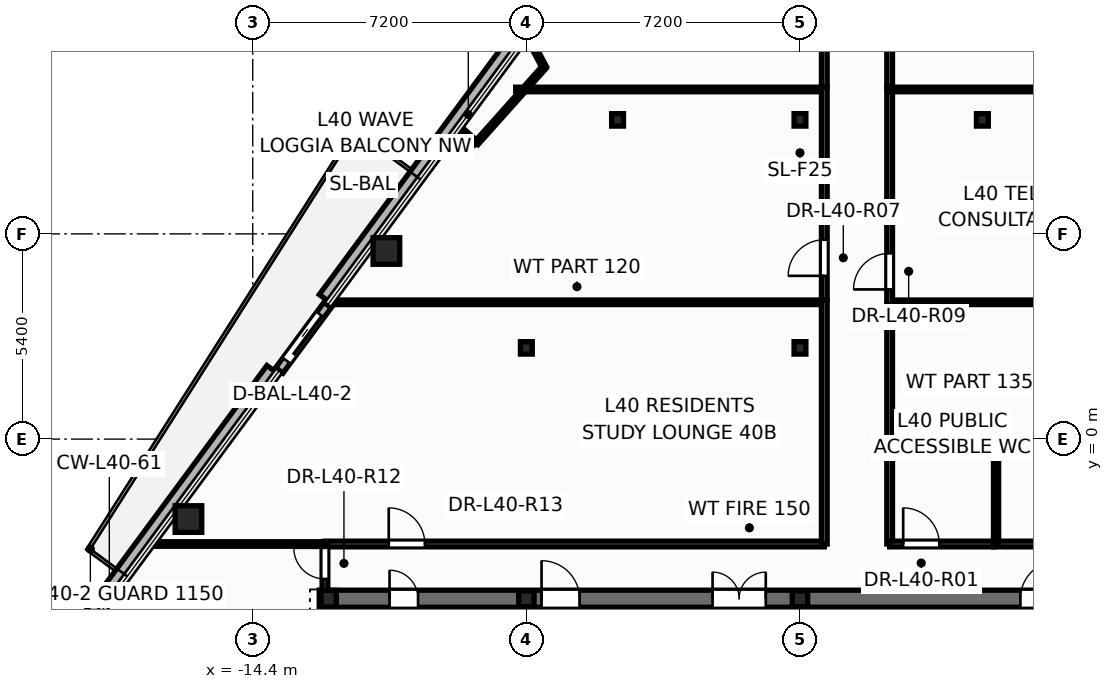
"""IFC4 building model, lengths in metres.
Left out: names, types, materials, properties, quantities, classifications, styles, units other than length and angle.
Written with IfcOpenShell. Run it as: python <this file> out.ifc"""

import sys

from ifc_helpers import new_model, si_unit, direction, frame, frame_2d, origin, origin_2d, place, context, subcontext, project, spatial, rectangle, hollow_circle, i_section, extrude, element, fill, save


model = new_model("IFC4")
c1 = context("Model", 3, precision=1e-05, world=origin(), true_north=direction((0.0, 1.0)))
c2 = subcontext(c1, "Body", "Model", "MODEL_VIEW")
j1 = project(units=[si_unit("LENGTHUNIT", "METRE"), si_unit("PLANEANGLEUNIT", "RADIAN")], contexts=[c1])
p1 = place(None, origin())
s1 = spatial("IfcSite", under=j1, at=p1, CompositionType="ELEMENT")
p2 = place(p1, origin())
s2 = spatial("IfcBuilding", under=s1, at=p2, CompositionType="ELEMENT")
p3 = place(p2, frame((0.0, 0.0, 154.5)))
s3 = spatial("IfcBuildingStorey", under=s2, at=p3, CompositionType="ELEMENT", Elevation=154.5)
for number, where, z_axis, x_axis in (
    (1, (-10.883, 4.95, 0.0), (0.0, 0.0, 1.0), (1.0, 0.0, 0.0)),
    (2, (-16.092, -2.103, 0.0), (0.0, 0.0, 1.0), (1.0, 0.0, 0.0)),
):
    element("IfcColumn", number, at=place(p3, frame(where, z_axis=z_axis, x_axis=x_axis)), inside=s3, PredefinedType="COLUMN", context=c2, shape_type="SweptSolid", body=[
        extrude(hollow_circle(Radius=0.35, WallThickness=0.03, at=origin_2d()), origin(), (0.0, 0.0, 1.0), 3.6),
    ])
p4 = place(p3, frame((-12.4, -4.2, 0.0), z_axis=(0.0, 0.0, 1.0), x_axis=(1.0, 0.0, 0.0)))
e3 = element("IfcColumn", 3, at=p4, inside=s3, PredefinedType="COLUMN", context=c2, shape_type="SweptSolid", body=[
    extrude(i_section(OverallWidth=0.4, OverallDepth=0.44, WebThickness=0.028, FlangeThickness=0.04, at=origin_2d()), origin(), (0.0, 0.0, 1.0), 3.6),
])
for number, where, z_axis, x_axis in (
    (4, (-7.2, -4.2, 0.0), (0.0, 0.0, 1.0), (1.0, 0.0, 0.0)),
    (5, (0.0, -4.2, 0.0), (0.0, 0.0, 1.0), (1.0, 0.0, 0.0)),
):
    element("IfcColumn", number, at=place(p3, frame(where, z_axis=z_axis, x_axis=x_axis)), inside=s3, PredefinedType="PILASTER", context=c2, shape_type="SweptSolid", body=[
        extrude(i_section(OverallWidth=0.405, OverallDepth=0.414, WebThickness=0.022, FlangeThickness=0.032, at=origin_2d()), origin(), (0.0, 0.0, 1.0), 3.6),
    ])
for number, where, z_axis, x_axis in (
    (6, (-7.2, 2.4, 0.0), (0.0, 0.0, 1.0), (1.0, 0.0, 0.0)),
    (7, (0.0, 2.4, 0.0), (0.0, 0.0, 1.0), (1.0, 0.0, 0.0)),
    (8, (-4.8, 8.4, 0.0), (0.0, 0.0, 1.0), (1.0, 0.0, 0.0)),
    (9, (0.0, 8.4, 0.0), (0.0, 0.0, 1.0), (1.0, 0.0, 0.0)),
    (10, (4.8, 8.4, 0.0), (0.0, 0.0, 1.0), (1.0, 0.0, 0.0)),
):
    element("IfcColumn", number, at=place(p3, frame(where, z_axis=z_axis, x_axis=x_axis)), inside=s3, PredefinedType="COLUMN", context=c2, shape_type="SweptSolid", body=[
        extrude(i_section(OverallWidth=0.311, OverallDepth=0.327, WebThickness=0.016, FlangeThickness=0.025, at=origin_2d()), origin(), (0.0, 0.0, 1.0), 3.6),
    ])
p5 = place(p3, frame((13.901, 1.806, -0.2), z_axis=(0.0, 0.0, 1.0), x_axis=(-0.594075751219, 0.804409101026, 0.0)))
e11 = element("IfcWall", 11, at=p5, inside=s3, PredefinedType="PARAPET", context=c2, shape_type="SweptSolid", body=[
    extrude(rectangle(XDim=14.632, YDim=0.36, at=frame_2d((7.316, 0.0))), origin(), (0.0, 0.0, 1.0), 0.38),
])
p6 = place(p3, frame((-5.208, 13.576, -0.2), z_axis=(0.0, 0.0, 1.0), x_axis=(-0.594071325753, -0.804412369322, 0.0)))
e12 = element("IfcWall", 12, at=p6, inside=s3, PredefinedType="PARAPET", context=c2, shape_type="SweptSolid", body=[
    extrude(rectangle(XDim=12.282, YDim=0.36, at=frame_2d((6.141, 0.0))), origin(), (0.0, 0.0, 1.0), 0.38),
])
p7 = place(p3, frame((-13.883, 1.83, -0.2), z_axis=(0.0, 0.0, 1.0), x_axis=(-0.594082392526, -0.804404196216, 0.0)))
e13 = element("IfcWall", 13, at=p7, inside=s3, PredefinedType="PARAPET", context=c2, shape_type="SweptSolid", body=[
    extrude(rectangle(XDim=14.88, YDim=0.36, at=frame_2d((7.44, 0.0))), origin(), (0.0, 0.0, 1.0), 0.38),
])
p8 = place(p3, frame((-12.429, 3.529, -0.015), z_axis=(0.0, 0.0, 1.0), x_axis=(-0.594050978498, -0.804427395696, 0.0)))
e14 = element("IfcWall", 14, at=p8, inside=s3, PredefinedType="STANDARD", context=c2, shape_type="SweptSolid", body=[
    extrude(rectangle(XDim=2.14, YDim=0.24, at=frame_2d((1.07, 0.0))), origin(), (0.0, 0.0, 1.0), 2.807),
])
p9 = place(p8, frame((0.32, 0.0, 0.015)))
e15 = element("IfcOpeningElement", 15, at=p9, cuts=e14, PredefinedType="OPENING", context=c2, shape_type="SweptSolid", body=[
    extrude(rectangle(XDim=1.506, YDim=2.204, at=frame_2d((0.75, 1.102))), frame((0.0, 0.13, 0.0), z_axis=(0.0, -1.0, 0.0), x_axis=(1.0, 0.0, 0.0)), (0.0, 0.0, 1.0), 0.26),
])
p10 = place(p3, frame((-2.88, -5.6, 0.0), z_axis=(0.0, 0.0, 1.0), x_axis=(0.0, 1.0, 0.0)))
e16 = element("IfcWall", 16, at=p10, inside=s3, PredefinedType="PARTITIONING", context=c2, shape_type="SweptSolid", body=[
    extrude(rectangle(XDim=1.15, YDim=0.15, at=frame_2d((0.575, 0.0))), origin(), (0.0, 0.0, 1.0), 3.35),
])
p11 = place(p3, frame((-12.65, -4.2, 0.0), z_axis=(0.0, 0.0, 1.0), x_axis=(1.0, 0.0, 0.0)))
e17 = element("IfcWall", 17, at=p11, inside=s3, PredefinedType="SHEAR", context=c2, shape_type="SweptSolid", body=[
    extrude(rectangle(XDim=25.3, YDim=0.45, at=frame_2d((12.65, 0.0))), origin(), (0.0, 0.0, 1.0), 3.6),
])
p12 = place(p11, frame((1.85, 0.0, 0.0)))
e18 = element("IfcOpeningElement", 18, at=p12, cuts=e17, PredefinedType="OPENING", context=c2, shape_type="SweptSolid", body=[
    extrude(rectangle(XDim=0.756, YDim=2.054, at=frame_2d((0.375, 1.027))), frame((0.0, 0.235, 0.0), z_axis=(0.0, -1.0, 0.0), x_axis=(1.0, 0.0, 0.0)), (0.0, 0.0, 1.0), 0.47),
])
p13 = place(p11, frame((21.85, 0.0, 0.0)))
e19 = element("IfcOpeningElement", 19, at=p13, cuts=e17, PredefinedType="OPENING", context=c2, shape_type="SweptSolid", body=[
    extrude(rectangle(XDim=0.756, YDim=2.054, at=frame_2d((0.375, 1.027))), frame((0.0, 0.235, 0.0), z_axis=(0.0, -1.0, 0.0), x_axis=(1.0, 0.0, 0.0)), (0.0, 0.0, 1.0), 0.47),
])
p14 = place(p11, frame((23.5, 0.0, 0.0)))
e20 = element("IfcOpeningElement", 20, at=p14, cuts=e17, PredefinedType="OPENING", context=c2, shape_type="SweptSolid", body=[
    extrude(rectangle(XDim=0.756, YDim=2.054, at=frame_2d((0.375, 1.027))), frame((0.0, 0.235, 0.0), z_axis=(0.0, -1.0, 0.0), x_axis=(1.0, 0.0, 0.0)), (0.0, 0.0, 1.0), 0.47),
])
p15 = place(p11, frame((5.85, 0.0, 0.0)))
e21 = element("IfcOpeningElement", 21, at=p15, cuts=e17, PredefinedType="OPENING", context=c2, shape_type="SweptSolid", body=[
    extrude(rectangle(XDim=1.006, YDim=2.104, at=frame_2d((0.5, 1.052))), frame((0.0, 0.235, 0.0), z_axis=(0.0, -1.0, 0.0), x_axis=(1.0, 0.0, 0.0)), (0.0, 0.0, 1.0), 0.47),
])
p16 = place(p11, frame((10.35, 0.0, 0.0)))
e22 = element("IfcOpeningElement", 22, at=p16, cuts=e17, PredefinedType="OPENING", context=c2, shape_type="SweptSolid", body=[
    extrude(rectangle(XDim=1.406, YDim=2.154, at=frame_2d((0.7, 1.077))), frame((0.0, 0.235, 0.0), z_axis=(0.0, -1.0, 0.0), x_axis=(1.0, 0.0, 0.0)), (0.0, 0.0, 1.0), 0.47),
])
p17 = place(p11, frame((18.45, 0.0, 0.0)))
e23 = element("IfcOpeningElement", 23, at=p17, cuts=e17, PredefinedType="OPENING", context=c2, shape_type="SweptSolid", body=[
    extrude(rectangle(XDim=1.006, YDim=2.104, at=frame_2d((0.5, 1.052))), frame((0.0, 0.235, 0.0), z_axis=(0.0, -1.0, 0.0), x_axis=(1.0, 0.0, 0.0)), (0.0, 0.0, 1.0), 0.47),
])
p18 = place(p3, frame((-8.48, -13.85, 0.0), z_axis=(0.0, 0.0, 1.0), x_axis=(0.0, 1.0, 0.0)))
e24 = element("IfcWall", 24, at=p18, inside=s3, PredefinedType="SHEAR", context=c2, shape_type="SweptSolid", body=[
    extrude(rectangle(XDim=9.4, YDim=0.25, at=frame_2d((4.7, 0.0))), origin(), (0.0, 0.0, 1.0), 3.6),
])
p19 = place(p18, frame((6.95, 0.0, 0.0)))
e25 = element("IfcOpeningElement", 25, at=p19, cuts=e24, PredefinedType="OPENING", context=c2, shape_type="SweptSolid", body=[
    extrude(rectangle(XDim=1.006, YDim=2.104, at=frame_2d((0.5, 1.052))), frame((0.0, 0.135, 0.0), z_axis=(0.0, -1.0, 0.0), x_axis=(1.0, 0.0, 0.0)), (0.0, 0.0, 1.0), 0.27),
])
for number, where, z_axis, x_axis in (
    (26, (-5.12, -13.85, 0.0), (0.0, 0.0, 1.0), (0.0, 1.0, 0.0)),
    (27, (5.12, -13.85, 0.0), (0.0, 0.0, 1.0), (0.0, 1.0, 0.0)),
):
    element("IfcWall", number, at=place(p3, frame(where, z_axis=z_axis, x_axis=x_axis)), inside=s3, PredefinedType="SHEAR", context=c2, shape_type="SweptSolid", body=[
        extrude(rectangle(XDim=9.4, YDim=0.25, at=frame_2d((4.7, 0.0))), origin(), (0.0, 0.0, 1.0), 3.6),
    ])
p20 = place(p3, frame((-12.4, -13.85, 0.0), z_axis=(0.0, 0.0, 1.0), x_axis=(0.0, 1.0, 0.0)))
e28 = element("IfcWall", 28, at=p20, inside=s3, PredefinedType="SHEAR", context=c2, shape_type="SweptSolid", body=[
    extrude(rectangle(XDim=9.4, YDim=0.45, at=frame_2d((4.7, 0.0))), origin(), (0.0, 0.0, 1.0), 3.6),
])
p21 = place(p3, frame((2.88, -9.45, 0.0), z_axis=(0.0, 0.0, 1.0), x_axis=(0.0, 1.0, 0.0)))
e29 = element("IfcWall", 29, at=p21, inside=s3, PredefinedType="SOLIDWALL", context=c2, shape_type="SweptSolid", body=[
    extrude(rectangle(XDim=5.0, YDim=0.2, at=frame_2d((2.5, 0.0))), origin(), (0.0, 0.0, 1.0), 3.35),
])
p22 = place(p21, frame((0.7, 0.0, 0.0)))
e30 = element("IfcOpeningElement", 30, at=p22, cuts=e29, PredefinedType="OPENING", context=c2, shape_type="SweptSolid", body=[
    extrude(rectangle(XDim=1.106, YDim=2.104, at=frame_2d((0.55, 1.052))), frame((0.0, 0.11, 0.0), z_axis=(0.0, -1.0, 0.0), x_axis=(1.0, 0.0, 0.0)), (0.0, 0.0, 1.0), 0.22),
])
p23 = place(p21, frame((3.15, 0.0, 0.0)))
e31 = element("IfcOpeningElement", 31, at=p23, cuts=e29, PredefinedType="OPENING", context=c2, shape_type="SweptSolid", body=[
    extrude(rectangle(XDim=1.106, YDim=2.104, at=frame_2d((0.55, 1.052))), frame((0.0, 0.11, 0.0), z_axis=(0.0, -1.0, 0.0), x_axis=(1.0, 0.0, 0.0)), (0.0, 0.0, 1.0), 0.22),
])
p24 = place(p3, frame((-12.5, -2.76, 0.0), z_axis=(0.0, 0.0, 1.0), x_axis=(1.0, 0.0, 0.0)))
e32 = element("IfcWall", 32, at=p24, inside=s3, PredefinedType="PARTITIONING", context=c2, shape_type="SweptSolid", body=[
    extrude(rectangle(XDim=13.14, YDim=0.15, at=frame_2d((6.57, 0.0))), origin(), (0.0, 0.0, 1.0), 2.325),
])
p25 = place(p24, frame((1.679, 0.0, 0.0)))
e33 = element("IfcOpeningElement", 33, at=p25, cuts=e32, PredefinedType="OPENING", context=c2, shape_type="SweptSolid", body=[
    extrude(rectangle(XDim=0.956, YDim=2.104, at=frame_2d((0.475, 1.052))), frame((0.0, 0.085, 0.0), z_axis=(0.0, -1.0, 0.0), x_axis=(1.0, 0.0, 0.0)), (0.0, 0.0, 1.0), 0.17),
])
p26 = place(p3, frame((-12.377, 3.6, 0.0), z_axis=(0.0, 0.0, 1.0), x_axis=(1.0, 0.0, 0.0)))
e34 = element("IfcWall", 34, at=p26, inside=s3, PredefinedType="PARTITIONING", context=c2, shape_type="SweptSolid", body=[
    extrude(rectangle(XDim=13.017, YDim=0.12, at=frame_2d((6.508, 0.0))), origin(), (0.0, 0.0, 1.0), 2.325),
])
p27 = place(p3, frame((2.36, 3.6, 0.0), z_axis=(0.0, 0.0, 1.0), x_axis=(1.0, 0.0, 0.0)))
e35 = element("IfcWall", 35, at=p27, inside=s3, PredefinedType="PARTITIONING", context=c2, shape_type="SweptSolid", body=[
    extrude(rectangle(XDim=10.017, YDim=0.12, at=frame_2d((5.008, 0.0))), origin(), (0.0, 0.0, 1.0), 2.325),
])
p28 = place(p3, frame((-7.48, 9.2, 0.0), z_axis=(0.0, 0.0, 1.0), x_axis=(1.0, 0.0, 0.0)))
e36 = element("IfcWall", 36, at=p28, inside=s3, PredefinedType="PARTITIONING", context=c2, shape_type="SweptSolid", body=[
    extrude(rectangle(XDim=8.12, YDim=0.12, at=frame_2d((4.06, 0.0))), origin(), (0.0, 0.0, 1.0), 2.325),
])
p29 = place(p3, frame((5.1, -2.76, 0.0), z_axis=(0.0, 0.0, 1.0), x_axis=(1.0, 0.0, 0.0)))
e37 = element("IfcWall", 37, at=p29, inside=s3, PredefinedType="PARTITIONING", context=c2, shape_type="SweptSolid", body=[
    extrude(rectangle(XDim=7.4, YDim=0.15, at=frame_2d((3.7, 0.0))), origin(), (0.0, 0.0, 1.0), 2.325),
])
p30 = place(p29, frame((3.663, 0.0, 0.0)))
e38 = element("IfcOpeningElement", 38, at=p30, cuts=e37, PredefinedType="OPENING", context=c2, shape_type="SweptSolid", body=[
    extrude(rectangle(XDim=0.956, YDim=2.104, at=frame_2d((0.475, 1.052))), frame((0.0, 0.085, 0.0), z_axis=(0.0, -1.0, 0.0), x_axis=(1.0, 0.0, 0.0)), (0.0, 0.0, 1.0), 0.17),
])
p31 = place(p3, frame((0.64, -2.76, 0.0), z_axis=(0.0, 0.0, 1.0), x_axis=(0.0, 1.0, 0.0)))
e39 = element("IfcWall", 39, at=p31, inside=s3, PredefinedType="PARTITIONING", context=c2, shape_type="SweptSolid", body=[
    extrude(rectangle(XDim=6.42, YDim=0.15, at=frame_2d((3.21, 0.0))), origin(), (0.0, 0.0, 1.0), 2.325),
])
p32 = place(p3, frame((0.64, 3.662, 0.0), z_axis=(0.0, 0.0, 1.0), x_axis=(0.0, 1.0, 0.0)))
e40 = element("IfcWall", 40, at=p32, inside=s3, PredefinedType="PARTITIONING", context=c2, shape_type="SweptSolid", body=[
    extrude(rectangle(XDim=5.598, YDim=0.15, at=frame_2d((2.799, 0.0))), origin(), (0.0, 0.0, 1.0), 2.325),
])
p33 = place(p32, frame((0.634, 0.0, 0.0)))
e41 = element("IfcOpeningElement", 41, at=p33, cuts=e40, PredefinedType="OPENING", context=c2, shape_type="SweptSolid", body=[
    extrude(rectangle(XDim=0.956, YDim=2.104, at=frame_2d((0.475, 1.052))), frame((0.0, 0.085, 0.0), z_axis=(0.0, -1.0, 0.0), x_axis=(1.0, 0.0, 0.0)), (0.0, 0.0, 1.0), 0.17),
])
p34 = place(p3, frame((2.36, 3.54, 0.0), z_axis=(0.0, 0.0, 1.0), x_axis=(0.0, 1.0, 0.0)))
e42 = element("IfcWall", 42, at=p34, inside=s3, PredefinedType="PARTITIONING", context=c2, shape_type="SweptSolid", body=[
    extrude(rectangle(XDim=5.72, YDim=0.15, at=frame_2d((2.86, 0.0))), origin(), (0.0, 0.0, 1.0), 2.325),
])
p35 = place(p34, frame((0.398, 0.0, 0.0)))
e43 = element("IfcOpeningElement", 43, at=p35, cuts=e42, PredefinedType="OPENING", context=c2, shape_type="SweptSolid", body=[
    extrude(rectangle(XDim=0.956, YDim=2.104, at=frame_2d((0.475, 1.052))), frame((0.0, 0.085, 0.0), z_axis=(0.0, -1.0, 0.0), x_axis=(1.0, 0.0, 0.0)), (0.0, 0.0, 1.0), 0.17),
])
p36 = place(p3, frame((2.36, 9.2, 0.0), z_axis=(0.0, 0.0, 1.0), x_axis=(1.0, 0.0, 0.0)))
e44 = element("IfcWall", 44, at=p36, inside=s3, PredefinedType="PARTITIONING", context=c2, shape_type="SweptSolid", body=[
    extrude(rectangle(XDim=5.12, YDim=0.12, at=frame_2d((2.56, 0.0))), origin(), (0.0, 0.0, 1.0), 2.325),
])
p37 = place(p3, frame((-17.074, -2.76, 0.0), z_axis=(0.0, 0.0, 1.0), x_axis=(1.0, 0.0, 0.0)))
e45 = element("IfcWall", 45, at=p37, inside=s3, PredefinedType="PARTITIONING", context=c2, shape_type="SweptSolid", body=[
    extrude(rectangle(XDim=4.574, YDim=0.12, at=frame_2d((2.287, 0.0))), origin(), (0.0, 0.0, 1.0), 2.792),
])
p38 = place(p3, frame((2.36, -2.76, 0.0), z_axis=(0.0, 0.0, 1.0), x_axis=(0.0, 1.0, 0.0)))
e46 = element("IfcWall", 46, at=p38, inside=s3, PredefinedType="PARTITIONING", context=c2, shape_type="SweptSolid", body=[
    extrude(rectangle(XDim=6.298, YDim=0.15, at=frame_2d((3.149, 0.0))), origin(), (0.0, 0.0, 1.0), 2.325),
])
p39 = place(p3, frame((2.36, -2.76, 0.0), z_axis=(0.0, 0.0, 1.0), x_axis=(1.0, 0.0, 0.0)))
e47 = element("IfcWall", 47, at=p39, inside=s3, PredefinedType="PARTITIONING", context=c2, shape_type="SweptSolid", body=[
    extrude(rectangle(XDim=2.738, YDim=0.15, at=frame_2d((1.369, 0.0))), origin(), (0.0, 0.0, 1.0), 2.919),
])
p40 = place(p39, frame((0.356, 0.0, 0.0)))
e48 = element("IfcOpeningElement", 48, at=p40, cuts=e47, PredefinedType="OPENING", context=c2, shape_type="SweptSolid", body=[
    extrude(rectangle(XDim=0.956, YDim=2.104, at=frame_2d((0.475, 1.052))), frame((0.0, 0.085, 0.0), z_axis=(0.0, -1.0, 0.0), x_axis=(1.0, 0.0, 0.0)), (0.0, 0.0, 1.0), 0.17),
])
p41 = place(p3, frame((2.36, -0.14, 0.0), z_axis=(0.0, 0.0, 1.0), x_axis=(1.0, 0.0, 0.0)))
e49 = element("IfcWall", 49, at=p41, inside=s3, PredefinedType="PARTITIONING", context=c2, shape_type="SweptSolid", body=[
    extrude(rectangle(XDim=2.8, YDim=0.135, at=frame_2d((1.4, 0.0))), origin(), (0.0, 0.0, 1.0), 2.919),
])
p42 = place(p3, frame((-6.73, 9.787, 0.0), z_axis=(0.0, 0.0, 1.0), x_axis=(-0.666312659733, -0.745672474669, 0.0)))
e50 = element("IfcWall", 50, at=p42, inside=s3, PredefinedType="PARTITIONING", context=c2, shape_type="SweptSolid", body=[
    extrude(rectangle(XDim=2.679, YDim=0.12, at=frame_2d((1.34, 0.0))), origin(), (0.0, 0.0, 1.0), 3.35),
])
p43 = place(p3, frame((0.64, 9.262, 0.0), z_axis=(0.0, 0.0, 1.0), x_axis=(0.0, 1.0, 0.0)))
e51 = element("IfcWall", 51, at=p43, inside=s3, PredefinedType="PARTITIONING", context=c2, shape_type="SweptSolid", body=[
    extrude(rectangle(XDim=2.538, YDim=0.15, at=frame_2d((1.269, 0.0))), origin(), (0.0, 0.0, 1.0), 3.35),
])
p44 = place(p43, frame((1.031, 0.0, 0.0)))
e52 = element("IfcOpeningElement", 52, at=p44, cuts=e51, PredefinedType="OPENING", context=c2, shape_type="SweptSolid", body=[
    extrude(rectangle(XDim=0.956, YDim=2.104, at=frame_2d((0.475, 1.052))), frame((0.0, 0.085, 0.0), z_axis=(0.0, -1.0, 0.0), x_axis=(1.0, 0.0, 0.0)), (0.0, 0.0, 1.0), 0.17),
])
p45 = place(p3, frame((2.36, 9.262, 0.0), z_axis=(0.0, 0.0, 1.0), x_axis=(0.0, 1.0, 0.0)))
e53 = element("IfcWall", 53, at=p45, inside=s3, PredefinedType="PARTITIONING", context=c2, shape_type="SweptSolid", body=[
    extrude(rectangle(XDim=2.538, YDim=0.15, at=frame_2d((1.269, 0.0))), origin(), (0.0, 0.0, 1.0), 3.35),
])
p46 = place(p3, frame((5.16, -2.76, 0.0), z_axis=(0.0, 0.0, 1.0), x_axis=(0.0, 1.0, 0.0)))
e54 = element("IfcWall", 54, at=p46, inside=s3, PredefinedType="PARTITIONING", context=c2, shape_type="SweptSolid", body=[
    extrude(rectangle(XDim=2.62, YDim=0.135, at=frame_2d((1.31, 0.0))), origin(), (0.0, 0.0, 1.0), 3.35),
])
p47 = place(p3, frame((-12.5, -4.24, 0.0), z_axis=(0.0, 0.0, 1.0), x_axis=(0.0, 1.0, 0.0)))
e55 = element("IfcWall", 55, at=p47, inside=s3, PredefinedType="PARTITIONING", context=c2, shape_type="SweptSolid", body=[
    extrude(rectangle(XDim=1.48, YDim=0.15, at=frame_2d((0.74, 0.0))), origin(), (0.0, 0.0, 1.0), 2.325),
])
p48 = place(p47, frame((0.56, 0.0, 0.0)))
e56 = element("IfcOpeningElement", 56, at=p48, cuts=e55, PredefinedType="OPENING", context=c2, shape_type="SweptSolid", body=[
    extrude(rectangle(XDim=0.826, YDim=2.104, at=frame_2d((0.41, 1.052))), frame((0.0, 0.085, 0.0), z_axis=(0.0, -1.0, 0.0), x_axis=(1.0, 0.0, 0.0)), (0.0, 0.0, 1.0), 0.17),
])
p49 = place(p3, frame((-7.123, 10.527, 0.0), z_axis=(0.0, 0.0, 1.0), x_axis=(0.468650828585, -0.883383495921, 0.0)))
e57 = element("IfcWall", 57, at=p49, inside=s3, PredefinedType="PARTITIONING", context=c2, shape_type="SweptSolid", body=[
    extrude(rectangle(XDim=0.838, YDim=0.12, at=frame_2d((0.419, 0.0))), origin(), (0.0, 0.0, 1.0), 2.792),
])
p50 = place(p3, frame((-8.516, 7.789, 0.0), z_axis=(0.0, 0.0, 1.0), x_axis=(-0.745596898323, 0.666397227793, 0.0)))
e58 = element("IfcWall", 58, at=p50, inside=s3, PredefinedType="PARTITIONING", context=c2, shape_type="SweptSolid", body=[
    extrude(rectangle(XDim=0.61, YDim=0.12, at=frame_2d((0.305, 0.0))), origin(), (0.0, 0.0, 1.0), 2.792),
])
p51 = place(p9, origin())
e59 = element("IfcDoor", 59, at=p51, inside=s3, OperationType="SLIDING_TO_RIGHT", PredefinedType="DOOR", context=c2, shape_type="SweptSolid", body=[
    extrude(rectangle(XDim=1.5, YDim=2.2, at=frame_2d((0.75, 1.1))), frame((0.0, 0.025, 0.0), z_axis=(0.0, -1.0, 0.0), x_axis=(1.0, 0.0, 0.0)), (0.0, 0.0, 1.0), 0.05),
])
fill(e15, e59)
p52 = place(p12, origin())
e60 = element("IfcDoor", 60, at=p52, inside=s3, OperationType="SINGLE_SWING_LEFT", PredefinedType="DOOR", context=c2, shape_type="SweptSolid", body=[
    extrude(rectangle(XDim=0.75, YDim=2.05, at=frame_2d((0.375, 1.025))), frame((0.0, 0.025, 0.0), z_axis=(0.0, -1.0, 0.0), x_axis=(1.0, 0.0, 0.0)), (0.0, 0.0, 1.0), 0.05),
])
fill(e18, e60)
p53 = place(p15, origin())
e61 = element("IfcDoor", 61, at=p53, inside=s3, OperationType="SINGLE_SWING_LEFT", PredefinedType="DOOR", context=c2, shape_type="SweptSolid", body=[
    extrude(rectangle(XDim=1.0, YDim=2.1, at=frame_2d((0.5, 1.05))), frame((0.0, 0.025, 0.0), z_axis=(0.0, -1.0, 0.0), x_axis=(1.0, 0.0, 0.0)), (0.0, 0.0, 1.0), 0.05),
])
fill(e21, e61)
p54 = place(p16, origin())
e62 = element("IfcDoor", 62, at=p54, inside=s3, OperationType="DOUBLE_DOOR_SINGLE_SWING", PredefinedType="DOOR", context=c2, shape_type="SweptSolid", body=[
    extrude(rectangle(XDim=1.4, YDim=2.15, at=frame_2d((0.7, 1.075))), frame((0.0, 0.025, 0.0), z_axis=(0.0, -1.0, 0.0), x_axis=(1.0, 0.0, 0.0)), (0.0, 0.0, 1.0), 0.05),
])
fill(e22, e62)
p55 = place(p17, origin())
e63 = element("IfcDoor", 63, at=p55, inside=s3, OperationType="SINGLE_SWING_RIGHT", PredefinedType="DOOR", context=c2, shape_type="SweptSolid", body=[
    extrude(rectangle(XDim=1.0, YDim=2.1, at=frame_2d((0.5, 1.05))), frame((0.0, 0.025, 0.0), z_axis=(0.0, -1.0, 0.0), x_axis=(1.0, 0.0, 0.0)), (0.0, 0.0, 1.0), 0.05),
])
fill(e23, e63)
p56 = place(p40, origin())
e64 = element("IfcDoor", 64, at=p56, inside=s3, OperationType="SINGLE_SWING_LEFT", PredefinedType="DOOR", context=c2, shape_type="SweptSolid", body=[
    extrude(rectangle(XDim=0.95, YDim=2.1, at=frame_2d((0.475, 1.05))), frame((0.0, 0.025, 0.0), z_axis=(0.0, -1.0, 0.0), x_axis=(1.0, 0.0, 0.0)), (0.0, 0.0, 1.0), 0.05),
])
fill(e48, e64)
p57 = place(p33, origin())
e65 = element("IfcDoor", 65, at=p57, inside=s3, OperationType="SINGLE_SWING_LEFT", PredefinedType="DOOR", context=c2, shape_type="SweptSolid", body=[
    extrude(rectangle(XDim=0.95, YDim=2.1, at=frame_2d((0.475, 1.05))), frame((0.0, 0.025, 0.0), z_axis=(0.0, -1.0, 0.0), x_axis=(1.0, 0.0, 0.0)), (0.0, 0.0, 1.0), 0.05),
])
fill(e41, e65)
p58 = place(p35, origin())
e66 = element("IfcDoor", 66, at=p58, inside=s3, OperationType="SINGLE_SWING_LEFT", PredefinedType="DOOR", context=c2, shape_type="SweptSolid", body=[
    extrude(rectangle(XDim=0.95, YDim=2.1, at=frame_2d((0.475, 1.05))), frame((0.0, 0.025, 0.0), z_axis=(0.0, -1.0, 0.0), x_axis=(1.0, 0.0, 0.0)), (0.0, 0.0, 1.0), 0.05),
])
fill(e43, e66)
p59 = place(p48, origin())
e67 = element("IfcDoor", 67, at=p59, inside=s3, OperationType="SINGLE_SWING_RIGHT", PredefinedType="DOOR", context=c2, shape_type="SweptSolid", body=[
    extrude(rectangle(XDim=0.82, YDim=2.1, at=frame_2d((0.41, 1.05))), frame((0.0, 0.025, 0.0), z_axis=(0.0, -1.0, 0.0), x_axis=(1.0, 0.0, 0.0)), (0.0, 0.0, 1.0), 0.05),
])
fill(e56, e67)
p60 = place(p25, origin())
e68 = element("IfcDoor", 68, at=p60, inside=s3, OperationType="SINGLE_SWING_LEFT", PredefinedType="DOOR", context=c2, shape_type="SweptSolid", body=[
    extrude(rectangle(XDim=0.95, YDim=2.1, at=frame_2d((0.475, 1.05))), frame((0.0, 0.025, 0.0), z_axis=(0.0, -1.0, 0.0), x_axis=(1.0, 0.0, 0.0)), (0.0, 0.0, 1.0), 0.05),
])
fill(e33, e68)
save(model, sys.argv[1])
